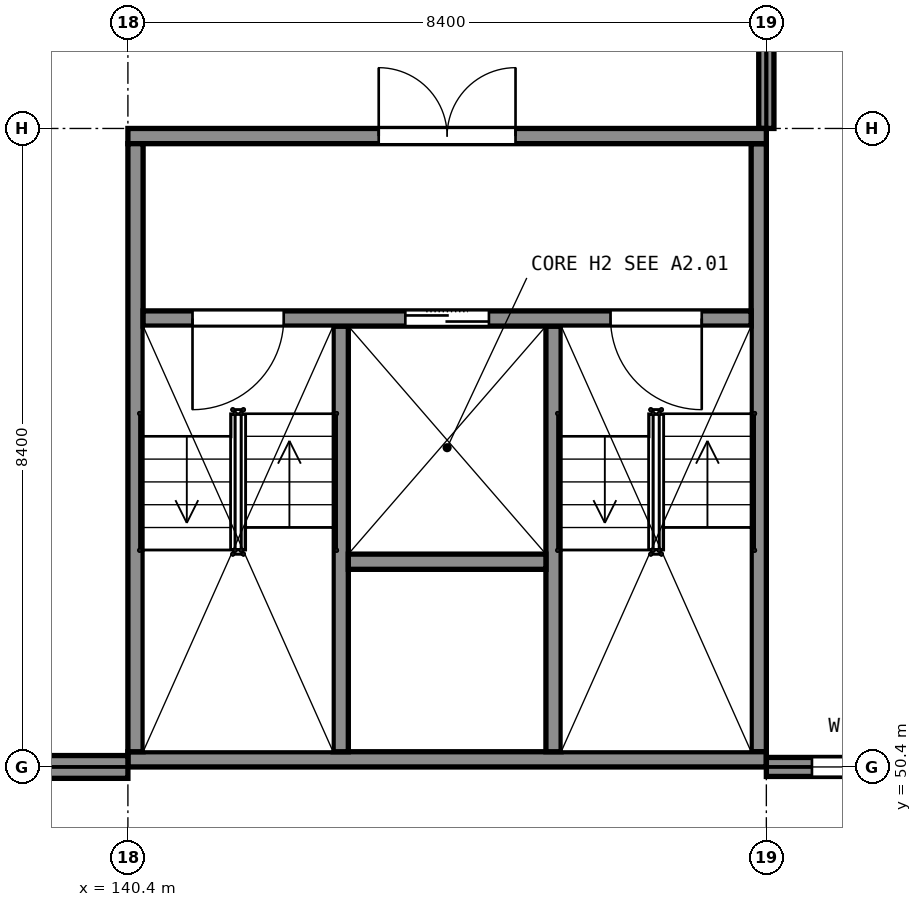
"""IFC4 building model, lengths in metres.
Left out: names, types, materials, properties, quantities, classifications, styles, units other than length and angle.
Written with IfcOpenShell. Run it as: python <this file> out.ifc"""

import sys

from ifc_helpers import new_model, si_unit, direction, frame, frame_2d, origin, place, context, subcontext, project, spatial, rectangle, extrude, element, fill, save


model = new_model("IFC4")
c1 = context("Model", 3, precision=1e-05, world=origin(), true_north=direction((0.0, 1.0)))
c2 = subcontext(c1, "Body", "Model", "MODEL_VIEW")
j1 = project(units=[si_unit("LENGTHUNIT", "METRE"), si_unit("PLANEANGLEUNIT", "RADIAN")], contexts=[c1])
p1 = place(None, origin())
s1 = spatial("IfcSite", under=j1, at=p1, CompositionType="ELEMENT")
p2 = place(p1, origin())
s2 = spatial("IfcBuilding", under=s1, at=p2, CompositionType="ELEMENT")
p3 = place(p2, frame((0.0, 0.0, 5.5)))
s3 = spatial("IfcBuildingStorey", under=s2, at=p3, CompositionType="ELEMENT", Elevation=5.5)
p4 = place(p3, frame((140.4, 50.5, 0.0), z_axis=(0.0, 0.0, 1.0), x_axis=(1.0, 0.0, 0.0)))
e1 = element("IfcWall", 1, at=p4, inside=s3, PredefinedType="SHEAR", context=c2, shape_type="SweptSolid", body=[
    extrude(rectangle(XDim=8.4, YDim=0.2, at=frame_2d((4.2, 0.0))), origin(), (0.0, 0.0, 1.0), 5.0),
])
p5 = place(p3, frame((140.4, 58.7, 0.0), z_axis=(0.0, 0.0, 1.0), x_axis=(1.0, 0.0, 0.0)))
e2 = element("IfcWall", 2, at=p5, inside=s3, PredefinedType="SHEAR", context=c2, shape_type="SweptSolid", body=[
    extrude(rectangle(XDim=8.4, YDim=0.2, at=frame_2d((4.2, 0.0))), origin(), (0.0, 0.0, 1.0), 5.0),
])
p6 = place(p5, frame((3.3, 0.0, 0.0)))
e3 = element("IfcOpeningElement", 3, at=p6, cuts=e2, PredefinedType="OPENING", context=c2, shape_type="SweptSolid", body=[
    extrude(rectangle(XDim=1.8, YDim=2.1, at=frame_2d((0.9, 1.05))), frame((0.0, 0.11, 0.0), z_axis=(0.0, -1.0, 0.0), x_axis=(1.0, 0.0, 0.0)), (0.0, 0.0, 1.0), 0.22),
])
for number, where, z_axis, x_axis in (
    (4, (140.5, 50.6, 0.0), (0.0, 0.0, 1.0), (0.0, 1.0, 0.0)),
    (5, (148.7, 50.6, 0.0), (0.0, 0.0, 1.0), (0.0, 1.0, 0.0)),
):
    element("IfcWall", number, at=place(p3, frame(where, z_axis=z_axis, x_axis=x_axis)), inside=s3, PredefinedType="SHEAR", context=c2, shape_type="SweptSolid", body=[
        extrude(rectangle(XDim=8.0, YDim=0.2, at=frame_2d((4.0, 0.0))), origin(), (0.0, 0.0, 1.0), 5.0),
    ])
p7 = place(p3, frame((140.6, 56.3, 0.0), z_axis=(0.0, 0.0, 1.0), x_axis=(1.0, 0.0, 0.0)))
e6 = element("IfcWall", 6, at=p7, inside=s3, PredefinedType="SHEAR", context=c2, shape_type="SweptSolid", body=[
    extrude(rectangle(XDim=8.0, YDim=0.2, at=frame_2d((4.0, 0.0))), origin(), (0.0, 0.0, 1.0), 5.0),
])
p8 = place(p7, frame((0.65, 0.0, 0.0)))
e7 = element("IfcOpeningElement", 7, at=p8, cuts=e6, PredefinedType="OPENING", context=c2, shape_type="SweptSolid", body=[
    extrude(rectangle(XDim=1.2, YDim=2.1, at=frame_2d((0.6, 1.05))), frame((0.0, 0.11, 0.0), z_axis=(0.0, -1.0, 0.0), x_axis=(1.0, 0.0, 0.0)), (0.0, 0.0, 1.0), 0.22),
])
p9 = place(p7, frame((6.15, 0.0, 0.0)))
e8 = element("IfcOpeningElement", 8, at=p9, cuts=e6, PredefinedType="OPENING", context=c2, shape_type="SweptSolid", body=[
    extrude(rectangle(XDim=1.2, YDim=2.1, at=frame_2d((0.6, 1.05))), frame((0.0, 0.11, 0.0), z_axis=(0.0, -1.0, 0.0), x_axis=(1.0, 0.0, 0.0)), (0.0, 0.0, 1.0), 0.22),
])
p10 = place(p7, frame((3.45, 0.0, 0.0)))
e9 = element("IfcOpeningElement", 9, at=p10, cuts=e6, PredefinedType="OPENING", context=c2, shape_type="SweptSolid", body=[
    extrude(rectangle(XDim=1.1, YDim=2.1, at=frame_2d((0.55, 1.05))), frame((0.0, 0.11, 0.0), z_axis=(0.0, -1.0, 0.0), x_axis=(1.0, 0.0, 0.0)), (0.0, 0.0, 1.0), 0.22),
])
for number, where, z_axis, x_axis in (
    (10, (143.2, 50.6, 0.0), (0.0, 0.0, 1.0), (0.0, 1.0, 0.0)),
    (11, (146.0, 50.6, 0.0), (0.0, 0.0, 1.0), (0.0, 1.0, 0.0)),
):
    element("IfcWall", number, at=place(p3, frame(where, z_axis=z_axis, x_axis=x_axis)), inside=s3, PredefinedType="SHEAR", context=c2, shape_type="SweptSolid", body=[
        extrude(rectangle(XDim=5.6, YDim=0.2, at=frame_2d((2.8, 0.0))), origin(), (0.0, 0.0, 1.0), 5.0),
    ])
p11 = place(p3, frame((143.3, 53.1, 0.0), z_axis=(0.0, 0.0, 1.0), x_axis=(1.0, 0.0, 0.0)))
e12 = element("IfcWall", 12, at=p11, inside=s3, PredefinedType="SHEAR", context=c2, shape_type="SweptSolid", body=[
    extrude(rectangle(XDim=2.6, YDim=0.2, at=frame_2d((1.3, 0.0))), origin(), (0.0, 0.0, 1.0), 5.0),
])
p12 = place(p3, frame((132.4, 50.4, 0.0), z_axis=(0.0, 0.0, 1.0), x_axis=(1.0, 0.0, 0.0)))
e13 = element("IfcWall", 13, at=p12, inside=s3, PredefinedType="SOLIDWALL", context=c2, shape_type="SweptSolid", body=[
    extrude(rectangle(XDim=8.0, YDim=0.3, at=frame_2d((4.0, 0.0))), origin(), (0.0, 0.0, 1.0), 3.94),
])
p13 = place(p3, frame((148.8, 50.4, 0.0), z_axis=(0.0, 0.0, 1.0), x_axis=(1.0, 0.0, 0.0)))
e14 = element("IfcWall", 14, at=p13, inside=s3, PredefinedType="SOLIDWALL", context=c2, shape_type="SweptSolid", body=[
    extrude(rectangle(XDim=8.0, YDim=0.25, at=frame_2d((4.0, 0.0))), origin(), (0.0, 0.0, 1.0), 3.94),
])
p14 = place(p13, frame((0.6, 0.0, 0.9)))
e15 = element("IfcOpeningElement", 15, at=p14, cuts=e14, PredefinedType="OPENING", context=c2, shape_type="SweptSolid", body=[
    extrude(rectangle(XDim=1.2, YDim=2.1, at=frame_2d((0.6, 1.05))), frame((0.0, 0.135, 0.0), z_axis=(0.0, -1.0, 0.0), x_axis=(1.0, 0.0, 0.0)), (0.0, 0.0, 1.0), 0.27),
])
p15 = place(p13, frame((2.85, 0.0, 0.9)))
e16 = element("IfcOpeningElement", 16, at=p15, cuts=e14, PredefinedType="OPENING", context=c2, shape_type="SweptSolid", body=[
    extrude(rectangle(XDim=1.2, YDim=2.1, at=frame_2d((0.6, 1.05))), frame((0.0, 0.135, 0.0), z_axis=(0.0, -1.0, 0.0), x_axis=(1.0, 0.0, 0.0)), (0.0, 0.0, 1.0), 0.27),
])
p16 = place(p13, frame((6.2, 0.0, 0.9)))
e17 = element("IfcOpeningElement", 17, at=p16, cuts=e14, PredefinedType="OPENING", context=c2, shape_type="SweptSolid", body=[
    extrude(rectangle(XDim=1.2, YDim=2.1, at=frame_2d((0.6, 1.05))), frame((0.0, 0.135, 0.0), z_axis=(0.0, -1.0, 0.0), x_axis=(1.0, 0.0, 0.0)), (0.0, 0.0, 1.0), 0.27),
])
p17 = place(p3, frame((148.8, 58.8, 0.0), z_axis=(0.0, 0.0, 1.0), x_axis=(0.0, 1.0, 0.0)))
e18 = element("IfcWall", 18, at=p17, inside=s3, PredefinedType="PARTITIONING", context=c2, shape_type="SweptSolid", body=[
    extrude(rectangle(XDim=8.0, YDim=0.2, at=frame_2d((4.0, 0.0))), origin(), (0.0, 0.0, 1.0), 3.9),
])
p18 = place(p17, frame((1.025, 0.0, 0.0)))
e19 = element("IfcOpeningElement", 19, at=p18, cuts=e18, PredefinedType="OPENING", context=c2, shape_type="SweptSolid", body=[
    extrude(rectangle(XDim=2.4, YDim=2.4, at=frame_2d((1.2, 1.2))), frame((0.0, 0.11, 0.0), z_axis=(0.0, -1.0, 0.0), x_axis=(1.0, 0.0, 0.0)), (0.0, 0.0, 1.0), 0.22),
])
p19 = place(p14, origin())
e20 = element("IfcWindow", 20, at=p19, inside=s3, PartitioningType="SINGLE_PANEL", PredefinedType="WINDOW", context=c2, shape_type="SweptSolid", body=[
    extrude(rectangle(XDim=1.2, YDim=2.1, at=frame_2d((0.6, 1.05))), frame((0.0, 0.105, 0.0), z_axis=(0.0, -1.0, 0.0), x_axis=(1.0, 0.0, 0.0)), (0.0, 0.0, 1.0), 0.06),
])
fill(e15, e20)
p20 = place(p6, origin())
e21 = element("IfcDoor", 21, at=p20, inside=s3, OperationType="DOUBLE_DOOR_SINGLE_SWING", PredefinedType="DOOR", context=c2, shape_type="SweptSolid", body=[
    extrude(rectangle(XDim=1.8, YDim=2.1, at=frame_2d((0.9, 1.05))), frame((0.0, 0.025, 0.0), z_axis=(0.0, -1.0, 0.0), x_axis=(1.0, 0.0, 0.0)), (0.0, 0.0, 1.0), 0.05),
])
fill(e3, e21)
p21 = place(p8, origin())
e22 = element("IfcDoor", 22, at=p21, inside=s3, OperationType="SINGLE_SWING_LEFT", PredefinedType="DOOR", context=c2, shape_type="SweptSolid", body=[
    extrude(rectangle(XDim=1.2, YDim=2.1, at=frame_2d((0.6, 1.05))), frame((0.0, 0.025, 0.0), z_axis=(0.0, -1.0, 0.0), x_axis=(1.0, 0.0, 0.0)), (0.0, 0.0, 1.0), 0.05),
])
fill(e7, e22)
p22 = place(p9, origin())
e23 = element("IfcDoor", 23, at=p22, inside=s3, OperationType="SINGLE_SWING_RIGHT", PredefinedType="DOOR", context=c2, shape_type="SweptSolid", body=[
    extrude(rectangle(XDim=1.2, YDim=2.1, at=frame_2d((0.6, 1.05))), frame((0.0, 0.025, 0.0), z_axis=(0.0, -1.0, 0.0), x_axis=(1.0, 0.0, 0.0)), (0.0, 0.0, 1.0), 0.05),
])
fill(e8, e23)
p23 = place(p10, origin())
e24 = element("IfcDoor", 24, at=p23, inside=s3, OperationType="DOUBLE_DOOR_SLIDING", PredefinedType="DOOR", context=c2, shape_type="SweptSolid", body=[
    extrude(rectangle(XDim=1.1, YDim=2.1, at=frame_2d((0.55, 1.05))), frame((0.0, 0.025, 0.0), z_axis=(0.0, -1.0, 0.0), x_axis=(1.0, 0.0, 0.0)), (0.0, 0.0, 1.0), 0.05),
])
fill(e9, e24)
save(model, sys.argv[1])
